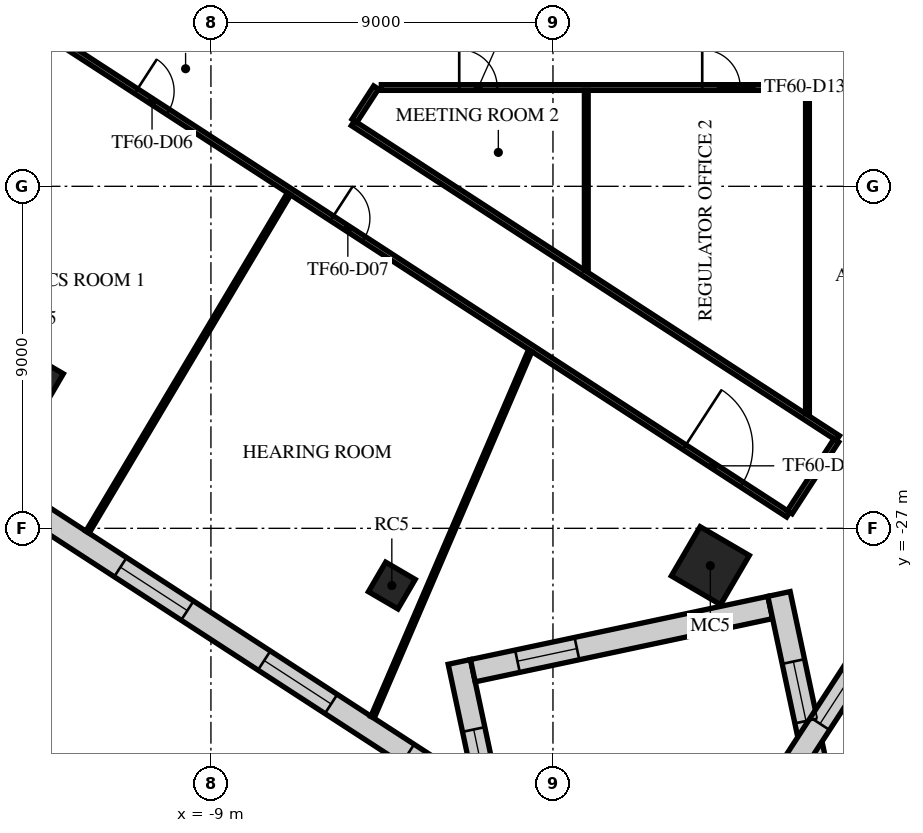
"""IFC4 building model, lengths in metres.
Left out: names, types, materials, properties, quantities, classifications, styles, units other than length and angle.
Written with IfcOpenShell. Run it as: python <this file> out.ifc"""

import sys

from ifc_helpers import new_model, si_unit, direction, frame, frame_2d, origin, origin_2d, place, context, subcontext, project, spatial, rectangle, extrude, element, fill, save


model = new_model("IFC4")
c1 = context("Model", 3, precision=1e-05, world=origin(), true_north=direction((0.0, 1.0)))
c2 = subcontext(c1, "Body", "Model", "MODEL_VIEW")
j1 = project(units=[si_unit("LENGTHUNIT", "METRE"), si_unit("PLANEANGLEUNIT", "RADIAN")], contexts=[c1])
p1 = place(None, origin())
s1 = spatial("IfcSite", under=j1, at=p1, CompositionType="ELEMENT")
p2 = place(p1, origin())
s2 = spatial("IfcBuilding", under=s1, at=p2, CompositionType="ELEMENT")
p3 = place(p2, frame((0.0, 0.0, 254.9)))
s3 = spatial("IfcBuildingStorey", under=s2, at=p3, CompositionType="ELEMENT", Elevation=254.9)
for number, where, z_axis, x_axis in (
    (1, (-13.499, -23.094, 0.0), (0.0, 0.0, 1.0), (0.505, 0.863, 0.0)),
    (2, (-4.24, -28.506, 0.0), (0.0, 0.0, 1.0), (0.505, 0.863, 0.0)),
):
    element("IfcColumn", number, at=place(p3, frame(where, z_axis=z_axis, x_axis=x_axis)), inside=s3, PredefinedType="COLUMN", context=c2, shape_type="SweptSolid", body=[
        extrude(rectangle(XDim=0.9, YDim=0.9, at=origin_2d()), origin(), (0.0, 0.0, 1.0), 4.0),
    ])
p4 = place(p3, frame((4.141, -27.983, 0.0), z_axis=(0.0, 0.0, 1.0), x_axis=(0.504643651291, 0.863327739165, 0.0)))
e3 = element("IfcColumn", 3, at=p4, inside=s3, PredefinedType="COLUMN", context=c2, shape_type="SweptSolid", body=[
    extrude(rectangle(XDim=1.5, YDim=1.5, at=origin_2d()), origin(), (0.0, 0.0, 1.0), 4.0),
])
p5 = place(p3, frame((-31.308, -15.082, 0.0), z_axis=(0.0, 0.0, 1.0), x_axis=(0.838671071298, -0.54463825992, 0.0)))
e4 = element("IfcWall", 4, at=p5, inside=s3, PredefinedType="STANDARD", context=c2, shape_type="SweptSolid", body=[
    extrude(rectangle(XDim=36.086, YDim=0.6, at=frame_2d((18.043, 0.0))), origin(), (0.0, 0.0, 1.0), 3.64),
])
p6 = place(p5, frame((1.205, 0.0, 0.9)))
e5 = element("IfcOpeningElement", 5, at=p6, cuts=e4, PredefinedType="OPENING", context=c2, shape_type="SweptSolid", body=[
    extrude(rectangle(XDim=2.1, YDim=2.1, at=frame_2d((1.05, 1.05))), frame((0.0, 0.31, 0.0), z_axis=(0.0, -1.0, 0.0), x_axis=(1.0, 0.0, 0.0)), (0.0, 0.0, 1.0), 0.62),
])
p7 = place(p5, frame((5.716, 0.0, 0.9)))
e6 = element("IfcOpeningElement", 6, at=p7, cuts=e4, PredefinedType="OPENING", context=c2, shape_type="SweptSolid", body=[
    extrude(rectangle(XDim=2.1, YDim=2.1, at=frame_2d((1.05, 1.05))), frame((0.0, 0.31, 0.0), z_axis=(0.0, -1.0, 0.0), x_axis=(1.0, 0.0, 0.0)), (0.0, 0.0, 1.0), 0.62),
])
p8 = place(p5, frame((10.227, 0.0, 0.9)))
e7 = element("IfcOpeningElement", 7, at=p8, cuts=e4, PredefinedType="OPENING", context=c2, shape_type="SweptSolid", body=[
    extrude(rectangle(XDim=2.1, YDim=2.1, at=frame_2d((1.05, 1.05))), frame((0.0, 0.31, 0.0), z_axis=(0.0, -1.0, 0.0), x_axis=(1.0, 0.0, 0.0)), (0.0, 0.0, 1.0), 0.62),
])
p9 = place(p5, frame((14.738, 0.0, 0.9)))
e8 = element("IfcOpeningElement", 8, at=p9, cuts=e4, PredefinedType="OPENING", context=c2, shape_type="SweptSolid", body=[
    extrude(rectangle(XDim=2.1, YDim=2.1, at=frame_2d((1.05, 1.05))), frame((0.0, 0.31, 0.0), z_axis=(0.0, -1.0, 0.0), x_axis=(1.0, 0.0, 0.0)), (0.0, 0.0, 1.0), 0.62),
])
p10 = place(p5, frame((19.249, 0.0, 0.9)))
e9 = element("IfcOpeningElement", 9, at=p10, cuts=e4, PredefinedType="OPENING", context=c2, shape_type="SweptSolid", body=[
    extrude(rectangle(XDim=2.1, YDim=2.1, at=frame_2d((1.05, 1.05))), frame((0.0, 0.31, 0.0), z_axis=(0.0, -1.0, 0.0), x_axis=(1.0, 0.0, 0.0)), (0.0, 0.0, 1.0), 0.62),
])
p11 = place(p5, frame((23.759, 0.0, 0.9)))
e10 = element("IfcOpeningElement", 10, at=p11, cuts=e4, PredefinedType="OPENING", context=c2, shape_type="SweptSolid", body=[
    extrude(rectangle(XDim=2.1, YDim=2.1, at=frame_2d((1.05, 1.05))), frame((0.0, 0.31, 0.0), z_axis=(0.0, -1.0, 0.0), x_axis=(1.0, 0.0, 0.0)), (0.0, 0.0, 1.0), 0.62),
])
p12 = place(p5, frame((28.27, 0.0, 0.9)))
e11 = element("IfcOpeningElement", 11, at=p12, cuts=e4, PredefinedType="OPENING", context=c2, shape_type="SweptSolid", body=[
    extrude(rectangle(XDim=2.1, YDim=2.1, at=frame_2d((1.05, 1.05))), frame((0.0, 0.31, 0.0), z_axis=(0.0, -1.0, 0.0), x_axis=(1.0, 0.0, 0.0)), (0.0, 0.0, 1.0), 0.62),
])
p13 = place(p5, frame((32.781, 0.0, 0.9)))
e12 = element("IfcOpeningElement", 12, at=p13, cuts=e4, PredefinedType="OPENING", context=c2, shape_type="SweptSolid", body=[
    extrude(rectangle(XDim=2.1, YDim=2.1, at=frame_2d((1.05, 1.05))), frame((0.0, 0.31, 0.0), z_axis=(0.0, -1.0, 0.0), x_axis=(1.0, 0.0, 0.0)), (0.0, 0.0, 1.0), 0.62),
])
p14 = place(p3, frame((-1.5, -35.05, 0.0), z_axis=(0.0, 0.0, 1.0), x_axis=(-0.207881432465, 0.978154031856, 0.0)))
e13 = element("IfcWall", 13, at=p14, inside=s3, PredefinedType="STANDARD", context=c2, shape_type="SweptSolid", body=[
    extrude(rectangle(XDim=4.635, YDim=0.6, at=frame_2d((2.318, 0.0))), origin(), (0.0, 0.0, 1.0), 3.64),
])
p15 = place(p14, frame((1.218, 0.0, 0.9)))
e14 = element("IfcOpeningElement", 14, at=p15, cuts=e13, PredefinedType="OPENING", context=c2, shape_type="SweptSolid", body=[
    extrude(rectangle(XDim=1.6, YDim=2.1, at=frame_2d((0.8, 1.05))), frame((0.0, 0.31, 0.0), z_axis=(0.0, -1.0, 0.0), x_axis=(1.0, 0.0, 0.0)), (0.0, 0.0, 1.0), 0.62),
])
p16 = place(p3, frame((-2.108, -30.746, 0.0), z_axis=(0.0, 0.0, 1.0), x_axis=(0.978146749934, 0.207915693476, 0.0)))
e15 = element("IfcWall", 15, at=p16, inside=s3, PredefinedType="STANDARD", context=c2, shape_type="SweptSolid", body=[
    extrude(rectangle(XDim=8.0, YDim=0.6, at=frame_2d((4.0, 0.0))), origin(), (0.0, 0.0, 1.0), 3.64),
])
p17 = place(p16, frame((1.2, 0.0, 0.9)))
e16 = element("IfcOpeningElement", 16, at=p17, cuts=e15, PredefinedType="OPENING", context=c2, shape_type="SweptSolid", body=[
    extrude(rectangle(XDim=1.6, YDim=2.1, at=frame_2d((0.8, 1.05))), frame((0.0, 0.31, 0.0), z_axis=(0.0, -1.0, 0.0), x_axis=(1.0, 0.0, 0.0)), (0.0, 0.0, 1.0), 0.62),
])
p18 = place(p3, frame((5.948, -28.727, 0.0), z_axis=(0.0, 0.0, 1.0), x_axis=(0.207881432465, -0.978154031856, 0.0)))
e17 = element("IfcWall", 17, at=p18, inside=s3, PredefinedType="STANDARD", context=c2, shape_type="SweptSolid", body=[
    extrude(rectangle(XDim=4.635, YDim=0.6, at=frame_2d((2.318, 0.0))), origin(), (0.0, 0.0, 1.0), 3.64),
])
p19 = place(p18, frame((1.818, 0.0, 0.9)))
e18 = element("IfcOpeningElement", 18, at=p19, cuts=e17, PredefinedType="OPENING", context=c2, shape_type="SweptSolid", body=[
    extrude(rectangle(XDim=1.6, YDim=2.1, at=frame_2d((0.8, 1.05))), frame((0.0, 0.31, 0.0), z_axis=(0.0, -1.0, 0.0), x_axis=(1.0, 0.0, 0.0)), (0.0, 0.0, 1.0), 0.62),
])
p20 = place(p3, frame((6.367, -33.16, 0.0), z_axis=(0.0, 0.0, 1.0), x_axis=(0.544637371147, 0.838671648472, 0.0)))
e19 = element("IfcWall", 19, at=p20, inside=s3, PredefinedType="STANDARD", context=c2, shape_type="SweptSolid", body=[
    extrude(rectangle(XDim=48.686, YDim=0.6, at=frame_2d((24.343, 0.0))), origin(), (0.0, 0.0, 1.0), 3.64),
])
p21 = place(p20, frame((1.213, 0.0, 0.9)))
e20 = element("IfcOpeningElement", 20, at=p21, cuts=e19, PredefinedType="OPENING", context=c2, shape_type="SweptSolid", body=[
    extrude(rectangle(XDim=2.0, YDim=2.1, at=frame_2d((1.0, 1.05))), frame((0.0, 0.31, 0.0), z_axis=(0.0, -1.0, 0.0), x_axis=(1.0, 0.0, 0.0)), (0.0, 0.0, 1.0), 0.62),
])
p22 = place(p20, frame((5.639, 0.0, 0.9)))
e21 = element("IfcOpeningElement", 21, at=p22, cuts=e19, PredefinedType="OPENING", context=c2, shape_type="SweptSolid", body=[
    extrude(rectangle(XDim=2.0, YDim=2.1, at=frame_2d((1.0, 1.05))), frame((0.0, 0.31, 0.0), z_axis=(0.0, -1.0, 0.0), x_axis=(1.0, 0.0, 0.0)), (0.0, 0.0, 1.0), 0.62),
])
p23 = place(p20, frame((14.491, 0.0, 0.9)))
e22 = element("IfcOpeningElement", 22, at=p23, cuts=e19, PredefinedType="OPENING", context=c2, shape_type="SweptSolid", body=[
    extrude(rectangle(XDim=2.0, YDim=2.1, at=frame_2d((1.0, 1.05))), frame((0.0, 0.31, 0.0), z_axis=(0.0, -1.0, 0.0), x_axis=(1.0, 0.0, 0.0)), (0.0, 0.0, 1.0), 0.62),
])
p24 = place(p20, frame((18.917, 0.0, 0.9)))
e23 = element("IfcOpeningElement", 23, at=p24, cuts=e19, PredefinedType="OPENING", context=c2, shape_type="SweptSolid", body=[
    extrude(rectangle(XDim=2.0, YDim=2.1, at=frame_2d((1.0, 1.05))), frame((0.0, 0.31, 0.0), z_axis=(0.0, -1.0, 0.0), x_axis=(1.0, 0.0, 0.0)), (0.0, 0.0, 1.0), 0.62),
])
p25 = place(p20, frame((23.343, 0.0, 0.9)))
e24 = element("IfcOpeningElement", 24, at=p25, cuts=e19, PredefinedType="OPENING", context=c2, shape_type="SweptSolid", body=[
    extrude(rectangle(XDim=2.0, YDim=2.1, at=frame_2d((1.0, 1.05))), frame((0.0, 0.31, 0.0), z_axis=(0.0, -1.0, 0.0), x_axis=(1.0, 0.0, 0.0)), (0.0, 0.0, 1.0), 0.62),
])
p26 = place(p20, frame((27.769, 0.0, 0.9)))
e25 = element("IfcOpeningElement", 25, at=p26, cuts=e19, PredefinedType="OPENING", context=c2, shape_type="SweptSolid", body=[
    extrude(rectangle(XDim=2.0, YDim=2.1, at=frame_2d((1.0, 1.05))), frame((0.0, 0.31, 0.0), z_axis=(0.0, -1.0, 0.0), x_axis=(1.0, 0.0, 0.0)), (0.0, 0.0, 1.0), 0.62),
])
p27 = place(p20, frame((32.195, 0.0, 0.9)))
e26 = element("IfcOpeningElement", 26, at=p27, cuts=e19, PredefinedType="OPENING", context=c2, shape_type="SweptSolid", body=[
    extrude(rectangle(XDim=2.0, YDim=2.1, at=frame_2d((1.0, 1.05))), frame((0.0, 0.31, 0.0), z_axis=(0.0, -1.0, 0.0), x_axis=(1.0, 0.0, 0.0)), (0.0, 0.0, 1.0), 0.62),
])
p28 = place(p20, frame((36.621, 0.0, 0.9)))
e27 = element("IfcOpeningElement", 27, at=p28, cuts=e19, PredefinedType="OPENING", context=c2, shape_type="SweptSolid", body=[
    extrude(rectangle(XDim=2.0, YDim=2.1, at=frame_2d((1.0, 1.05))), frame((0.0, 0.31, 0.0), z_axis=(0.0, -1.0, 0.0), x_axis=(1.0, 0.0, 0.0)), (0.0, 0.0, 1.0), 0.62),
])
p29 = place(p20, frame((41.047, 0.0, 0.9)))
e28 = element("IfcOpeningElement", 28, at=p29, cuts=e19, PredefinedType="OPENING", context=c2, shape_type="SweptSolid", body=[
    extrude(rectangle(XDim=2.0, YDim=2.1, at=frame_2d((1.0, 1.05))), frame((0.0, 0.31, 0.0), z_axis=(0.0, -1.0, 0.0), x_axis=(1.0, 0.0, 0.0)), (0.0, 0.0, 1.0), 0.62),
])
p30 = place(p20, frame((45.473, 0.0, 0.9)))
e29 = element("IfcOpeningElement", 29, at=p30, cuts=e19, PredefinedType="OPENING", context=c2, shape_type="SweptSolid", body=[
    extrude(rectangle(XDim=2.0, YDim=2.1, at=frame_2d((1.0, 1.05))), frame((0.0, 0.31, 0.0), z_axis=(0.0, -1.0, 0.0), x_axis=(1.0, 0.0, 0.0)), (0.0, 0.0, 1.0), 0.62),
])
p31 = place(p3, frame((-26.791, -5.221, 0.0), z_axis=(0.0, 0.0, 1.0), x_axis=(0.838671905754, -0.544636974965, 0.0)))
e30 = element("IfcWall", 30, at=p31, inside=s3, PredefinedType="PARTITIONING", context=c2, shape_type="SweptSolid", body=[
    extrude(rectangle(XDim=39.325, YDim=0.15, at=frame_2d((19.663, 0.0))), origin(), (0.0, 0.0, 1.0), 3.04),
])
p32 = place(p31, frame((2.05, 0.0, 0.0)))
e31 = element("IfcOpeningElement", 31, at=p32, cuts=e30, PredefinedType="OPENING", context=c2, shape_type="SweptSolid", body=[
    extrude(rectangle(XDim=1.0, YDim=2.1, at=frame_2d((0.5, 1.05))), frame((0.0, 0.085, 0.0), z_axis=(0.0, -1.0, 0.0), x_axis=(1.0, 0.0, 0.0)), (0.0, 0.0, 1.0), 0.17),
])
p33 = place(p31, frame((9.807, 0.0, 0.0)))
e32 = element("IfcOpeningElement", 32, at=p33, cuts=e30, PredefinedType="OPENING", context=c2, shape_type="SweptSolid", body=[
    extrude(rectangle(XDim=1.0, YDim=2.1, at=frame_2d((0.5, 1.05))), frame((0.0, 0.085, 0.0), z_axis=(0.0, -1.0, 0.0), x_axis=(1.0, 0.0, 0.0)), (0.0, 0.0, 1.0), 0.17),
])
p34 = place(p31, frame((18.866, 0.0, 0.0)))
e33 = element("IfcOpeningElement", 33, at=p34, cuts=e30, PredefinedType="OPENING", context=c2, shape_type="SweptSolid", body=[
    extrude(rectangle(XDim=1.0, YDim=2.1, at=frame_2d((0.5, 1.05))), frame((0.0, 0.085, 0.0), z_axis=(0.0, -1.0, 0.0), x_axis=(1.0, 0.0, 0.0)), (0.0, 0.0, 1.0), 0.17),
])
p35 = place(p31, frame((25.009, 0.0, 0.0)))
e34 = element("IfcOpeningElement", 34, at=p35, cuts=e30, PredefinedType="OPENING", context=c2, shape_type="SweptSolid", body=[
    extrude(rectangle(XDim=1.0, YDim=2.1, at=frame_2d((0.5, 1.05))), frame((0.0, 0.085, 0.0), z_axis=(0.0, -1.0, 0.0), x_axis=(1.0, 0.0, 0.0)), (0.0, 0.0, 1.0), 0.17),
])
p36 = place(p31, frame((36.069, 0.0, 0.0)))
e35 = element("IfcOpeningElement", 35, at=p36, cuts=e30, PredefinedType="OPENING", context=c2, shape_type="SweptSolid", body=[
    extrude(rectangle(XDim=1.8, YDim=2.1, at=frame_2d((0.9, 1.05))), frame((0.0, 0.085, 0.0), z_axis=(0.0, -1.0, 0.0), x_axis=(1.0, 0.0, 0.0)), (0.0, 0.0, 1.0), 0.17),
])
p37 = place(p3, frame((-5.265, -16.339, 0.0), z_axis=(0.0, 0.0, 1.0), x_axis=(0.838696093785, -0.544599726653, 0.0)))
e36 = element("IfcWall", 36, at=p37, inside=s3, PredefinedType="PARTITIONING", context=c2, shape_type="SweptSolid", body=[
    extrude(rectangle(XDim=15.217, YDim=0.15, at=frame_2d((7.608, 0.0))), origin(), (0.0, 0.0, 1.0), 3.24),
])
p38 = place(p3, frame((-5.224, -16.276, 0.0), z_axis=(0.0, 0.0, 1.0), x_axis=(0.544684420792, 0.838641092331, 0.0)))
e37 = element("IfcWall", 37, at=p38, inside=s3, PredefinedType="PARTITIONING", context=c2, shape_type="SweptSolid", body=[
    extrude(rectangle(XDim=1.045, YDim=0.15, at=frame_2d((0.522, 0.0))), origin(), (0.0, 0.0, 1.0), 3.24),
])
p39 = place(p3, frame((-4.517, -15.4, 0.0), z_axis=(0.0, 0.0, 1.0), x_axis=(1.0, 0.0, 0.0)))
e38 = element("IfcWall", 38, at=p39, inside=s3, PredefinedType="PARTITIONING", context=c2, shape_type="SweptSolid", body=[
    extrude(rectangle(XDim=19.917, YDim=0.15, at=frame_2d((9.958, 0.0))), origin(), (0.0, 0.0, 1.0), 3.24),
])
p40 = place(p39, frame((2.05, 0.0, 0.0)))
e39 = element("IfcOpeningElement", 39, at=p40, cuts=e38, PredefinedType="OPENING", context=c2, shape_type="SweptSolid", body=[
    extrude(rectangle(XDim=1.0, YDim=2.1, at=frame_2d((0.5, 1.05))), frame((0.0, 0.085, 0.0), z_axis=(0.0, -1.0, 0.0), x_axis=(1.0, 0.0, 0.0)), (0.0, 0.0, 1.0), 0.17),
])
p41 = place(p39, frame((8.444, 0.0, 0.0)))
e40 = element("IfcOpeningElement", 40, at=p41, cuts=e38, PredefinedType="OPENING", context=c2, shape_type="SweptSolid", body=[
    extrude(rectangle(XDim=1.0, YDim=2.1, at=frame_2d((0.5, 1.05))), frame((0.0, 0.085, 0.0), z_axis=(0.0, -1.0, 0.0), x_axis=(1.0, 0.0, 0.0)), (0.0, 0.0, 1.0), 0.17),
])
p42 = place(p39, frame((13.014, 0.0, 0.0)))
e41 = element("IfcOpeningElement", 41, at=p42, cuts=e38, PredefinedType="OPENING", context=c2, shape_type="SweptSolid", body=[
    extrude(rectangle(XDim=1.0, YDim=2.1, at=frame_2d((0.5, 1.05))), frame((0.0, 0.085, 0.0), z_axis=(0.0, -1.0, 0.0), x_axis=(1.0, 0.0, 0.0)), (0.0, 0.0, 1.0), 0.17),
])
p43 = place(p3, frame((6.231, -26.576, 0.0), z_axis=(0.0, 0.0, 1.0), x_axis=(0.54464508689, 0.838666637781, 0.0)))
e42 = element("IfcWall", 42, at=p43, inside=s3, PredefinedType="PARTITIONING", context=c2, shape_type="SweptSolid", body=[
    extrude(rectangle(XDim=2.25, YDim=0.15, at=frame_2d((1.125, 0.0))), origin(), (0.0, 0.0, 1.0), 3.04),
])
p44 = place(p3, frame((-12.248, -27.099, 0.0), z_axis=(0.0, 0.0, 1.0), x_axis=(0.511779266972, 0.859116978005, 0.0)))
e43 = element("IfcWall", 43, at=p44, inside=s3, PredefinedType="PARTITIONING", context=c2, shape_type="SweptSolid", body=[
    extrude(rectangle(XDim=10.358, YDim=0.1, at=frame_2d((5.179, 0.0))), origin(), (0.0, 0.0, 1.0), 3.04),
])
p45 = place(p3, frame((-4.748, -31.97, 0.0), z_axis=(0.0, 0.0, 1.0), x_axis=(0.395131798832, 0.918624439884, 0.0)))
e44 = element("IfcWall", 44, at=p45, inside=s3, PredefinedType="PARTITIONING", context=c2, shape_type="SweptSolid", body=[
    extrude(rectangle(XDim=10.495, YDim=0.1, at=frame_2d((5.248, 0.0))), origin(), (0.0, 0.0, 1.0), 3.04),
])
p46 = place(p3, frame((0.877, -20.205, 0.0), z_axis=(0.0, 0.0, 1.0), x_axis=(0.0, 1.0, 0.0)))
e45 = element("IfcWall", 45, at=p46, inside=s3, PredefinedType="PARTITIONING", context=c2, shape_type="SweptSolid", body=[
    extrude(rectangle(XDim=4.73, YDim=0.1, at=frame_2d((2.365, 0.0))), origin(), (0.0, 0.0, 1.0), 3.64),
])
p47 = place(p3, frame((6.697, -23.984, 0.0), z_axis=(0.0, 0.0, 1.0), x_axis=(0.0, 1.0, 0.0)))
e46 = element("IfcWall", 46, at=p47, inside=s3, PredefinedType="PARTITIONING", context=c2, shape_type="SweptSolid", body=[
    extrude(rectangle(XDim=8.509, YDim=0.1, at=frame_2d((4.254, 0.0))), origin(), (0.0, 0.0, 1.0), 3.64),
])
p48 = place(p11, origin())
e47 = element("IfcWindow", 47, at=p48, inside=s3, PartitioningType="SINGLE_PANEL", PredefinedType="WINDOW", context=c2, shape_type="SweptSolid", body=[
    extrude(rectangle(XDim=2.1, YDim=2.1, at=frame_2d((1.05, 1.05))), frame((0.0, 0.03, 0.0), z_axis=(0.0, -1.0, 0.0), x_axis=(1.0, 0.0, 0.0)), (0.0, 0.0, 1.0), 0.06),
])
fill(e10, e47)
p49 = place(p12, origin())
e48 = element("IfcWindow", 48, at=p49, inside=s3, PartitioningType="SINGLE_PANEL", PredefinedType="WINDOW", context=c2, shape_type="SweptSolid", body=[
    extrude(rectangle(XDim=2.1, YDim=2.1, at=frame_2d((1.05, 1.05))), frame((0.0, 0.03, 0.0), z_axis=(0.0, -1.0, 0.0), x_axis=(1.0, 0.0, 0.0)), (0.0, 0.0, 1.0), 0.06),
])
fill(e11, e48)
p50 = place(p13, origin())
e49 = element("IfcWindow", 49, at=p50, inside=s3, PartitioningType="SINGLE_PANEL", PredefinedType="WINDOW", context=c2, shape_type="SweptSolid", body=[
    extrude(rectangle(XDim=2.1, YDim=2.1, at=frame_2d((1.05, 1.05))), frame((0.0, 0.03, 0.0), z_axis=(0.0, -1.0, 0.0), x_axis=(1.0, 0.0, 0.0)), (0.0, 0.0, 1.0), 0.06),
])
fill(e12, e49)
p51 = place(p15, origin())
e50 = element("IfcWindow", 50, at=p51, inside=s3, PartitioningType="SINGLE_PANEL", PredefinedType="WINDOW", context=c2, shape_type="SweptSolid", body=[
    extrude(rectangle(XDim=1.6, YDim=2.1, at=frame_2d((0.8, 1.05))), frame((0.0, 0.03, 0.0), z_axis=(0.0, -1.0, 0.0), x_axis=(1.0, 0.0, 0.0)), (0.0, 0.0, 1.0), 0.06),
])
fill(e14, e50)
p52 = place(p17, origin())
e51 = element("IfcWindow", 51, at=p52, inside=s3, PartitioningType="SINGLE_PANEL", PredefinedType="WINDOW", context=c2, shape_type="SweptSolid", body=[
    extrude(rectangle(XDim=1.6, YDim=2.1, at=frame_2d((0.8, 1.05))), frame((0.0, 0.03, 0.0), z_axis=(0.0, -1.0, 0.0), x_axis=(1.0, 0.0, 0.0)), (0.0, 0.0, 1.0), 0.06),
])
fill(e16, e51)
p53 = place(p19, origin())
e52 = element("IfcWindow", 52, at=p53, inside=s3, PartitioningType="SINGLE_PANEL", PredefinedType="WINDOW", context=c2, shape_type="SweptSolid", body=[
    extrude(rectangle(XDim=1.6, YDim=2.1, at=frame_2d((0.8, 1.05))), frame((0.0, 0.03, 0.0), z_axis=(0.0, -1.0, 0.0), x_axis=(1.0, 0.0, 0.0)), (0.0, 0.0, 1.0), 0.06),
])
fill(e18, e52)
p54 = place(p21, origin())
e53 = element("IfcWindow", 53, at=p54, inside=s3, PartitioningType="SINGLE_PANEL", PredefinedType="WINDOW", context=c2, shape_type="SweptSolid", body=[
    extrude(rectangle(XDim=2.0, YDim=2.1, at=frame_2d((1.0, 1.05))), frame((0.0, 0.03, 0.0), z_axis=(0.0, -1.0, 0.0), x_axis=(1.0, 0.0, 0.0)), (0.0, 0.0, 1.0), 0.06),
])
fill(e20, e53)
p55 = place(p34, frame((1.0, 0.0, 0.0), z_axis=(0.0, 0.0, 1.0), x_axis=(-1.0, 0.0, 0.0)))
e54 = element("IfcDoor", 54, at=p55, inside=s3, OperationType="SINGLE_SWING_RIGHT", PredefinedType="DOOR", context=c2, shape_type="SweptSolid", body=[
    extrude(rectangle(XDim=1.0, YDim=2.1, at=frame_2d((0.5, 1.05))), frame((0.0, 0.025, 0.0), z_axis=(0.0, -1.0, 0.0), x_axis=(1.0, 0.0, 0.0)), (0.0, 0.0, 1.0), 0.05),
])
fill(e33, e54)
p56 = place(p35, frame((1.0, 0.0, 0.0), z_axis=(0.0, 0.0, 1.0), x_axis=(-1.0, 0.0, 0.0)))
e55 = element("IfcDoor", 55, at=p56, inside=s3, OperationType="SINGLE_SWING_RIGHT", PredefinedType="DOOR", context=c2, shape_type="SweptSolid", body=[
    extrude(rectangle(XDim=1.0, YDim=2.1, at=frame_2d((0.5, 1.05))), frame((0.0, 0.025, 0.0), z_axis=(0.0, -1.0, 0.0), x_axis=(1.0, 0.0, 0.0)), (0.0, 0.0, 1.0), 0.05),
])
fill(e34, e55)
p57 = place(p40, frame((1.0, 0.0, 0.0), z_axis=(0.0, 0.0, 1.0), x_axis=(-1.0, 0.0, 0.0)))
e56 = element("IfcDoor", 56, at=p57, inside=s3, OperationType="SINGLE_SWING_RIGHT", PredefinedType="DOOR", context=c2, shape_type="SweptSolid", body=[
    extrude(rectangle(XDim=1.0, YDim=2.1, at=frame_2d((0.5, 1.05))), frame((0.0, 0.025, 0.0), z_axis=(0.0, -1.0, 0.0), x_axis=(1.0, 0.0, 0.0)), (0.0, 0.0, 1.0), 0.05),
])
fill(e39, e56)
p58 = place(p41, frame((1.0, 0.0, 0.0), z_axis=(0.0, 0.0, 1.0), x_axis=(-1.0, 0.0, 0.0)))
e57 = element("IfcDoor", 57, at=p58, inside=s3, OperationType="SINGLE_SWING_LEFT", PredefinedType="DOOR", context=c2, shape_type="SweptSolid", body=[
    extrude(rectangle(XDim=1.0, YDim=2.1, at=frame_2d((0.5, 1.05))), frame((0.0, 0.025, 0.0), z_axis=(0.0, -1.0, 0.0), x_axis=(1.0, 0.0, 0.0)), (0.0, 0.0, 1.0), 0.05),
])
fill(e40, e57)
p59 = place(p36, frame((1.8, 0.0, 0.0), z_axis=(0.0, 0.0, 1.0), x_axis=(-1.0, 0.0, 0.0)))
e58 = element("IfcDoor", 58, at=p59, inside=s3, OperationType="DOUBLE_DOOR_SINGLE_SWING", PredefinedType="DOOR", context=c2, shape_type="SweptSolid", body=[
    extrude(rectangle(XDim=1.8, YDim=2.1, at=frame_2d((0.9, 1.05))), frame((0.0, 0.025, 0.0), z_axis=(0.0, -1.0, 0.0), x_axis=(1.0, 0.0, 0.0)), (0.0, 0.0, 1.0), 0.05),
])
fill(e35, e58)
save(model, sys.argv[1])
